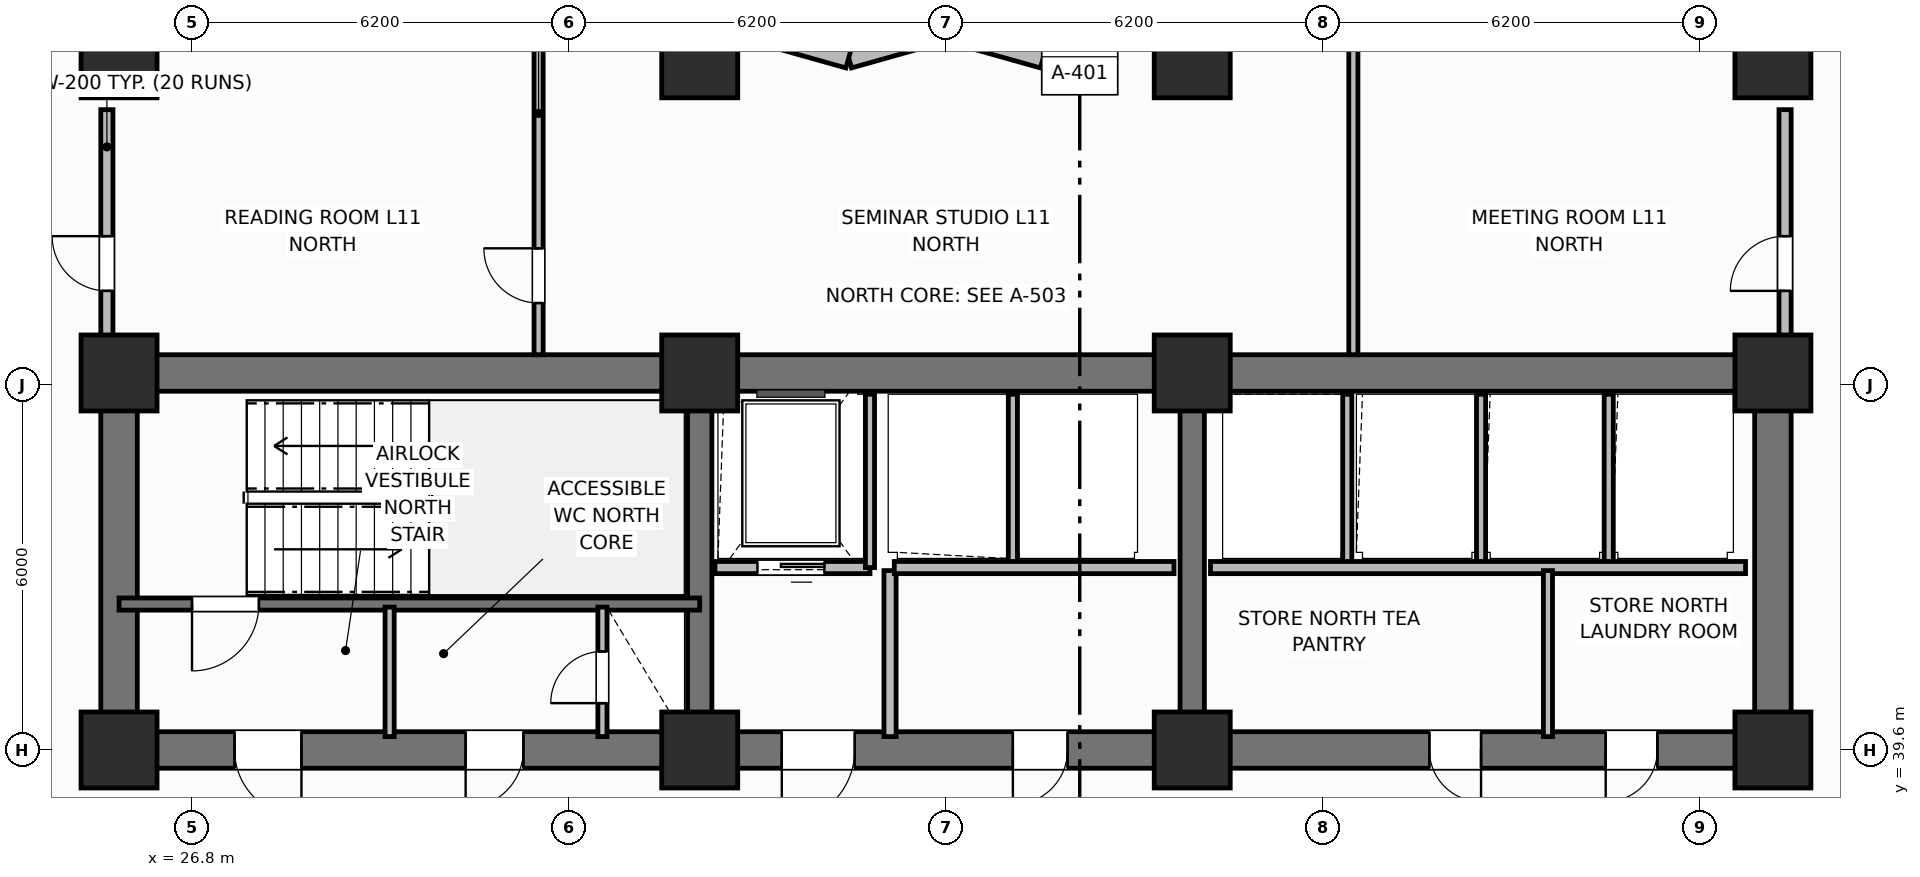
"""IFC4 building model, lengths in metres.
Left out: names, types, materials, properties, quantities, classifications, styles, units other than length and angle.
Written with IfcOpenShell. Run it as: python <this file> out.ifc"""

import sys

from ifc_helpers import new_model, si_unit, direction, frame, frame_2d, origin, origin_2d, place, context, subcontext, project, spatial, rectangle, extrude, element, fill, save


model = new_model("IFC4")
c1 = context("Model", 3, precision=1e-05, world=origin(), true_north=direction((0.0, 1.0)))
c2 = subcontext(c1, "Body", "Model", "MODEL_VIEW")
j1 = project(units=[si_unit("LENGTHUNIT", "METRE"), si_unit("PLANEANGLEUNIT", "RADIAN")], contexts=[c1])
p1 = place(None, origin())
s1 = spatial("IfcSite", under=j1, at=p1, CompositionType="ELEMENT")
p2 = place(p1, origin())
s2 = spatial("IfcBuilding", under=s1, at=p2, CompositionType="ELEMENT")
p3 = place(p2, frame((0.0, 0.0, 47.3)))
s3 = spatial("IfcBuildingStorey", under=s2, at=p3, CompositionType="ELEMENT", Elevation=47.3)
p4 = place(p3, frame((25.6, 45.8, 0.0), z_axis=(0.0, 0.0, 1.0), x_axis=(1.0, 0.0, 0.0)))
e1 = element("IfcWall", 1, at=p4, inside=s3, PredefinedType="SHEAR", context=c2, shape_type="SweptSolid", body=[
    extrude(rectangle(XDim=27.2, YDim=0.6, at=frame_2d((13.6, 0.0))), origin(), (0.0, 0.0, 1.0), 3.7),
])
for number, where, z_axis, x_axis in (
    (2, (25.6, 39.9, 0.0), (0.0, 0.0, 1.0), (0.0, 1.0, 0.0)),
    (3, (52.8, 39.9, 0.0), (0.0, 0.0, 1.0), (0.0, 1.0, 0.0)),
):
    element("IfcWall", number, at=place(p3, frame(where, z_axis=z_axis, x_axis=x_axis)), inside=s3, PredefinedType="SHEAR", context=c2, shape_type="SweptSolid", body=[
        extrude(rectangle(XDim=5.6, YDim=0.6, at=frame_2d((2.8, 0.0))), origin(), (0.0, 0.0, 1.0), 3.7),
    ])
p5 = place(p3, frame((52.8, 39.6, 0.0), z_axis=(0.0, 0.0, 1.0), x_axis=(-1.0, 0.0, 0.0)))
e4 = element("IfcWall", 4, at=p5, inside=s3, PredefinedType="SHEAR", context=c2, shape_type="SweptSolid", body=[
    extrude(rectangle(XDim=27.2, YDim=0.6, at=frame_2d((13.6, 0.0))), origin(), (0.0, 0.0, 1.0), 3.7),
])
p6 = place(p5, frame((24.2, 0.0, 0.0)))
e5 = element("IfcOpeningElement", 5, at=p6, cuts=e4, PredefinedType="OPENING", context=c2, shape_type="SweptSolid", body=[
    extrude(rectangle(XDim=1.1, YDim=2.15, at=frame_2d((0.55, 1.075))), frame((0.0, 0.31, 0.0), z_axis=(0.0, -1.0, 0.0), x_axis=(1.0, 0.0, 0.0)), (0.0, 0.0, 1.0), 0.62),
])
p7 = place(p5, frame((20.55, 0.0, 0.0)))
e6 = element("IfcOpeningElement", 6, at=p7, cuts=e4, PredefinedType="OPENING", context=c2, shape_type="SweptSolid", body=[
    extrude(rectangle(XDim=0.95, YDim=2.1, at=frame_2d((0.475, 1.05))), frame((0.0, 0.31, 0.0), z_axis=(0.0, -1.0, 0.0), x_axis=(1.0, 0.0, 0.0)), (0.0, 0.0, 1.0), 0.62),
])
p8 = place(p5, frame((15.1, 0.0, 0.0)))
e7 = element("IfcOpeningElement", 7, at=p8, cuts=e4, PredefinedType="OPENING", context=c2, shape_type="SweptSolid", body=[
    extrude(rectangle(XDim=1.2, YDim=2.15, at=frame_2d((0.6, 1.075))), frame((0.0, 0.31, 0.0), z_axis=(0.0, -1.0, 0.0), x_axis=(1.0, 0.0, 0.0)), (0.0, 0.0, 1.0), 0.62),
])
p9 = place(p5, frame((11.6, 0.0, 0.0)))
e8 = element("IfcOpeningElement", 8, at=p9, cuts=e4, PredefinedType="OPENING", context=c2, shape_type="SweptSolid", body=[
    extrude(rectangle(XDim=0.9, YDim=2.1, at=frame_2d((0.45, 1.05))), frame((0.0, 0.31, 0.0), z_axis=(0.0, -1.0, 0.0), x_axis=(1.0, 0.0, 0.0)), (0.0, 0.0, 1.0), 0.62),
])
p10 = place(p5, frame((4.8, 0.0, 0.0)))
e9 = element("IfcOpeningElement", 9, at=p10, cuts=e4, PredefinedType="OPENING", context=c2, shape_type="SweptSolid", body=[
    extrude(rectangle(XDim=0.85, YDim=2.1, at=frame_2d((0.425, 1.05))), frame((0.0, 0.31, 0.0), z_axis=(0.0, -1.0, 0.0), x_axis=(1.0, 0.0, 0.0)), (0.0, 0.0, 1.0), 0.62),
])
p11 = place(p5, frame((1.9, 0.0, 0.0)))
e10 = element("IfcOpeningElement", 10, at=p11, cuts=e4, PredefinedType="OPENING", context=c2, shape_type="SweptSolid", body=[
    extrude(rectangle(XDim=0.85, YDim=2.1, at=frame_2d((0.425, 1.05))), frame((0.0, 0.31, 0.0), z_axis=(0.0, -1.0, 0.0), x_axis=(1.0, 0.0, 0.0)), (0.0, 0.0, 1.0), 0.62),
])
for number, where, z_axis, x_axis in (
    (11, (35.15, 39.9, 0.0), (0.0, 0.0, 1.0), (0.0, 1.0, 0.0)),
    (12, (43.25, 39.9, 0.0), (0.0, 0.0, 1.0), (0.0, 1.0, 0.0)),
):
    element("IfcWall", number, at=place(p3, frame(where, z_axis=z_axis, x_axis=x_axis)), inside=s3, PredefinedType="SHEAR", context=c2, shape_type="SweptSolid", body=[
        extrude(rectangle(XDim=5.6, YDim=0.4, at=frame_2d((2.8, 0.0))), origin(), (0.0, 0.0, 1.0), 3.7),
    ])
for number, where, z_axis, x_axis in (
    (13, (25.6, 39.6, 0.0), (0.0, 0.0, 1.0), (1.0, 0.0, 0.0)),
    (14, (25.6, 45.8, 0.0), (0.0, 0.0, 1.0), (1.0, 0.0, 0.0)),
    (15, (35.15, 39.6, 0.0), (0.0, 0.0, 1.0), (1.0, 0.0, 0.0)),
    (16, (35.15, 45.8, 0.0), (0.0, 0.0, 1.0), (1.0, 0.0, 0.0)),
    (17, (43.25, 39.6, 0.0), (0.0, 0.0, 1.0), (1.0, 0.0, 0.0)),
    (18, (43.25, 45.8, 0.0), (0.0, 0.0, 1.0), (1.0, 0.0, 0.0)),
    (19, (52.8, 39.6, 0.0), (0.0, 0.0, 1.0), (1.0, 0.0, 0.0)),
    (20, (52.8, 45.8, 0.0), (0.0, 0.0, 1.0), (1.0, 0.0, 0.0)),
    (21, (25.6, 50.95, 0.0), (0.0, 0.0, 1.0), (1.0, 0.0, 0.0)),
    (22, (35.15, 50.95, 0.0), (0.0, 0.0, 1.0), (1.0, 0.0, 0.0)),
    (23, (43.25, 50.95, 0.0), (0.0, 0.0, 1.0), (1.0, 0.0, 0.0)),
    (24, (52.8, 50.95, 0.0), (0.0, 0.0, 1.0), (1.0, 0.0, 0.0)),
):
    element("IfcColumn", number, at=place(p3, frame(where, z_axis=z_axis, x_axis=x_axis)), inside=s3, PredefinedType="COLUMN", context=c2, shape_type="SweptSolid", body=[
        extrude(rectangle(XDim=1.25, YDim=1.25, at=origin_2d()), origin(), (0.0, 0.0, 1.0), 3.7),
    ])
p12 = place(p3, frame((42.4, 51.43, 0.0), z_axis=(0.0, 0.0, 1.0), x_axis=(-0.962652136636, -0.270741322725, 0.0)))
e25 = element("IfcWall", 25, at=p12, inside=s3, PredefinedType="SOLIDWALL", context=c2, shape_type="SweptSolid", body=[
    extrude(rectangle(XDim=1.662, YDim=0.34, at=frame_2d((0.831, 0.0))), origin(), (0.0, 0.0, 1.0), 2.7),
])
p13 = place(p3, frame((40.8, 50.98, 0.0), z_axis=(0.0, 0.0, 1.0), x_axis=(-0.962662902433, 0.270703040766, 0.0)))
e26 = element("IfcWall", 26, at=p13, inside=s3, PredefinedType="SOLIDWALL", context=c2, shape_type="SweptSolid", body=[
    extrude(rectangle(XDim=1.662, YDim=0.34, at=frame_2d((0.831, 0.0))), origin(), (0.0, 0.0, 1.0), 2.7),
])
p14 = place(p3, frame((39.2, 51.43, 0.0), z_axis=(0.0, 0.0, 1.0), x_axis=(-0.962652136636, -0.270741322725, 0.0)))
e27 = element("IfcWall", 27, at=p14, inside=s3, PredefinedType="SOLIDWALL", context=c2, shape_type="SweptSolid", body=[
    extrude(rectangle(XDim=1.662, YDim=0.34, at=frame_2d((0.831, 0.0))), origin(), (0.0, 0.0, 1.0), 2.7),
])
p15 = place(p3, frame((37.6, 50.98, 0.0), z_axis=(0.0, 0.0, 1.0), x_axis=(-0.962662902433, 0.270703040766, 0.0)))
e28 = element("IfcWall", 28, at=p15, inside=s3, PredefinedType="SOLIDWALL", context=c2, shape_type="SweptSolid", body=[
    extrude(rectangle(XDim=1.662, YDim=0.34, at=frame_2d((0.831, 0.0))), origin(), (0.0, 0.0, 1.0), 2.7),
])
p16 = place(p3, frame((35.15, 42.0, 0.0), z_axis=(0.0, 0.0, 1.0), x_axis=(-1.0, 0.0, 0.0)))
e29 = element("IfcWall", 29, at=p16, inside=s3, PredefinedType="SHEAR", context=c2, shape_type="SweptSolid", body=[
    extrude(rectangle(XDim=9.55, YDim=0.2, at=frame_2d((4.775, 0.0))), origin(), (0.0, 0.0, 1.0), 3.7),
])
p17 = place(p16, frame((7.25, 0.0, 0.0)))
e30 = element("IfcOpeningElement", 30, at=p17, cuts=e29, PredefinedType="OPENING", context=c2, shape_type="SweptSolid", body=[
    extrude(rectangle(XDim=1.1, YDim=2.15, at=frame_2d((0.55, 1.075))), frame((0.0, 0.11, 0.0), z_axis=(0.0, -1.0, 0.0), x_axis=(1.0, 0.0, 0.0)), (0.0, 0.0, 1.0), 0.22),
])
p18 = place(p3, frame((33.55, 39.82, 0.0), z_axis=(0.0, 0.0, 1.0), x_axis=(0.0, 1.0, 0.0)))
e31 = element("IfcWall", 31, at=p18, inside=s3, PredefinedType="PARTITIONING", context=c2, shape_type="SweptSolid", body=[
    extrude(rectangle(XDim=2.13, YDim=0.15, at=frame_2d((1.065, 0.0))), origin(), (0.0, 0.0, 1.0), 2.53),
])
p19 = place(p18, frame((0.55, 0.0, 0.0)))
e32 = element("IfcOpeningElement", 32, at=p19, cuts=e31, PredefinedType="OPENING", context=c2, shape_type="SweptSolid", body=[
    extrude(rectangle(XDim=0.85, YDim=2.05, at=frame_2d((0.425, 1.025))), frame((0.0, 0.085, 0.0), z_axis=(0.0, -1.0, 0.0), x_axis=(1.0, 0.0, 0.0)), (0.0, 0.0, 1.0), 0.17),
])
p20 = place(p3, frame((30.05, 39.82, 0.0), z_axis=(0.0, 0.0, 1.0), x_axis=(0.0, 1.0, 0.0)))
e33 = element("IfcWall", 33, at=p20, inside=s3, PredefinedType="PARTITIONING", context=c2, shape_type="SweptSolid", body=[
    extrude(rectangle(XDim=2.13, YDim=0.15, at=frame_2d((1.065, 0.0))), origin(), (0.0, 0.0, 1.0), 2.53),
])
p21 = place(p3, frame((37.95, 42.6, 0.0), z_axis=(0.0, 0.0, 1.0), x_axis=(-1.0, 0.0, 0.0)))
e34 = element("IfcWall", 34, at=p21, inside=s3, PredefinedType="PARTITIONING", context=c2, shape_type="SweptSolid", body=[
    extrude(rectangle(XDim=2.55, YDim=0.2, at=frame_2d((1.275, 0.0))), origin(), (0.0, 0.0, 1.0), 2.3),
])
p22 = place(p21, frame((0.75, 0.0, 0.0)))
e35 = element("IfcOpeningElement", 35, at=p22, cuts=e34, PredefinedType="OPENING", context=c2, shape_type="SweptSolid", body=[
    extrude(rectangle(XDim=1.1, YDim=2.15, at=frame_2d((0.55, 1.075))), frame((0.0, 0.11, 0.0), z_axis=(0.0, -1.0, 0.0), x_axis=(1.0, 0.0, 0.0)), (0.0, 0.0, 1.0), 0.22),
])
p23 = place(p3, frame((37.95, 42.6, 0.0), z_axis=(0.0, 0.0, 1.0), x_axis=(0.0, 1.0, 0.0)))
e36 = element("IfcWall", 36, at=p23, inside=s3, PredefinedType="PARTITIONING", context=c2, shape_type="SweptSolid", body=[
    extrude(rectangle(XDim=2.85, YDim=0.15, at=frame_2d((1.425, 0.0))), origin(), (0.0, 0.0, 1.0), 2.53),
])
p24 = place(p3, frame((38.28, 39.82, 0.0), z_axis=(0.0, 0.0, 1.0), x_axis=(0.0, 1.0, 0.0)))
e37 = element("IfcWall", 37, at=p24, inside=s3, PredefinedType="PARTITIONING", context=c2, shape_type="SweptSolid", body=[
    extrude(rectangle(XDim=2.73, YDim=0.2, at=frame_2d((1.365, 0.0))), origin(), (0.0, 0.0, 1.0), 2.53),
])
p25 = place(p3, frame((40.3, 42.65, 0.0), z_axis=(0.0, 0.0, 1.0), x_axis=(0.0, 1.0, 0.0)))
e38 = element("IfcWall", 38, at=p25, inside=s3, PredefinedType="PARTITIONING", context=c2, shape_type="SweptSolid", body=[
    extrude(rectangle(XDim=2.8, YDim=0.15, at=frame_2d((1.4, 0.0))), origin(), (0.0, 0.0, 1.0), 2.53),
])
p26 = place(p3, frame((42.95, 42.6, 0.0), z_axis=(0.0, 0.0, 1.0), x_axis=(-1.0, 0.0, 0.0)))
e39 = element("IfcWall", 39, at=p26, inside=s3, PredefinedType="PARTITIONING", context=c2, shape_type="SweptSolid", body=[
    extrude(rectangle(XDim=4.6, YDim=0.2, at=frame_2d((2.3, 0.0))), origin(), (0.0, 0.0, 1.0), 2.3),
])
for number, where, z_axis, x_axis in (
    (40, (45.8, 42.65, 0.0), (0.0, 0.0, 1.0), (0.0, 1.0, 0.0)),
    (41, (48.0, 42.65, 0.0), (0.0, 0.0, 1.0), (0.0, 1.0, 0.0)),
    (42, (50.1, 42.65, 0.0), (0.0, 0.0, 1.0), (0.0, 1.0, 0.0)),
):
    element("IfcWall", number, at=place(p3, frame(where, z_axis=z_axis, x_axis=x_axis)), inside=s3, PredefinedType="PARTITIONING", context=c2, shape_type="SweptSolid", body=[
        extrude(rectangle(XDim=2.8, YDim=0.15, at=frame_2d((1.4, 0.0))), origin(), (0.0, 0.0, 1.0), 2.53),
    ])
p27 = place(p3, frame((52.35, 42.6, 0.0), z_axis=(0.0, 0.0, 1.0), x_axis=(-1.0, 0.0, 0.0)))
e43 = element("IfcWall", 43, at=p27, inside=s3, PredefinedType="PARTITIONING", context=c2, shape_type="SweptSolid", body=[
    extrude(rectangle(XDim=8.8, YDim=0.2, at=frame_2d((4.4, 0.0))), origin(), (0.0, 0.0, 1.0), 2.53),
])
p28 = place(p3, frame((49.1, 39.82, 0.0), z_axis=(0.0, 0.0, 1.0), x_axis=(0.0, 1.0, 0.0)))
e44 = element("IfcWall", 44, at=p28, inside=s3, PredefinedType="PARTITIONING", context=c2, shape_type="SweptSolid", body=[
    extrude(rectangle(XDim=2.73, YDim=0.15, at=frame_2d((1.365, 0.0))), origin(), (0.0, 0.0, 1.0), 2.53),
])
p29 = place(p3, frame((32.5, 46.1, 0.0), z_axis=(0.0, 0.0, 1.0), x_axis=(0.0, 1.0, 0.0)))
e45 = element("IfcWall", 45, at=p29, inside=s3, PredefinedType="PARTITIONING", context=c2, shape_type="SweptSolid", body=[
    extrude(rectangle(XDim=5.33, YDim=0.15, at=frame_2d((2.665, 0.0))), origin(), (0.0, 0.0, 1.0), 2.53),
])
p30 = place(p29, frame((0.85, 0.0, 0.0)))
e46 = element("IfcOpeningElement", 46, at=p30, cuts=e45, PredefinedType="OPENING", context=c2, shape_type="SweptSolid", body=[
    extrude(rectangle(XDim=0.9, YDim=2.1, at=frame_2d((0.45, 1.05))), frame((0.0, 0.085, 0.0), z_axis=(0.0, -1.0, 0.0), x_axis=(1.0, 0.0, 0.0)), (0.0, 0.0, 1.0), 0.17),
])
p31 = place(p3, frame((45.9, 46.1, 0.0), z_axis=(0.0, 0.0, 1.0), x_axis=(0.0, 1.0, 0.0)))
e47 = element("IfcWall", 47, at=p31, inside=s3, PredefinedType="PARTITIONING", context=c2, shape_type="SweptSolid", body=[
    extrude(rectangle(XDim=5.33, YDim=0.15, at=frame_2d((2.665, 0.0))), origin(), (0.0, 0.0, 1.0), 2.53),
])
p32 = place(p3, frame((25.4, 46.1, 0.0), z_axis=(0.0, 0.0, 1.0), x_axis=(0.0, 1.0, 0.0)))
e48 = element("IfcWall", 48, at=p32, inside=s3, PredefinedType="PARTITIONING", context=c2, shape_type="SweptSolid", body=[
    extrude(rectangle(XDim=4.03, YDim=0.2, at=frame_2d((2.015, 0.0))), origin(), (0.0, 0.0, 1.0), 2.53),
])
p33 = place(p32, frame((1.05, 0.0, 0.0)))
e49 = element("IfcOpeningElement", 49, at=p33, cuts=e48, PredefinedType="OPENING", context=c2, shape_type="SweptSolid", body=[
    extrude(rectangle(XDim=0.9, YDim=2.1, at=frame_2d((0.45, 1.05))), frame((0.0, 0.11, 0.0), z_axis=(0.0, -1.0, 0.0), x_axis=(1.0, 0.0, 0.0)), (0.0, 0.0, 1.0), 0.22),
])
p34 = place(p3, frame((53.0, 46.1, 0.0), z_axis=(0.0, 0.0, 1.0), x_axis=(0.0, 1.0, 0.0)))
e50 = element("IfcWall", 50, at=p34, inside=s3, PredefinedType="PARTITIONING", context=c2, shape_type="SweptSolid", body=[
    extrude(rectangle(XDim=4.03, YDim=0.2, at=frame_2d((2.015, 0.0))), origin(), (0.0, 0.0, 1.0), 2.53),
])
p35 = place(p34, frame((1.05, 0.0, 0.0)))
e51 = element("IfcOpeningElement", 51, at=p35, cuts=e50, PredefinedType="OPENING", context=c2, shape_type="SweptSolid", body=[
    extrude(rectangle(XDim=0.9, YDim=2.1, at=frame_2d((0.45, 1.05))), frame((0.0, 0.11, 0.0), z_axis=(0.0, -1.0, 0.0), x_axis=(1.0, 0.0, 0.0)), (0.0, 0.0, 1.0), 0.22),
])
p36 = place(p17, origin())
e52 = element("IfcDoor", 52, at=p36, inside=s3, OperationType="SINGLE_SWING_RIGHT", PredefinedType="DOOR", context=c2, shape_type="SweptSolid", body=[
    extrude(rectangle(XDim=1.1, YDim=2.15, at=frame_2d((0.55, 1.075))), frame((0.0, 0.025, 0.0), z_axis=(0.0, -1.0, 0.0), x_axis=(1.0, 0.0, 0.0)), (0.0, 0.0, 1.0), 0.05),
])
fill(e30, e52)
p37 = place(p19, origin())
e53 = element("IfcDoor", 53, at=p37, inside=s3, OperationType="SINGLE_SWING_LEFT", PredefinedType="TRAPDOOR", context=c2, shape_type="SweptSolid", body=[
    extrude(rectangle(XDim=0.85, YDim=2.05, at=frame_2d((0.425, 1.025))), frame((0.0, 0.025, 0.0), z_axis=(0.0, -1.0, 0.0), x_axis=(1.0, 0.0, 0.0)), (0.0, 0.0, 1.0), 0.05),
])
fill(e32, e53)
p38 = place(p22, origin())
e54 = element("IfcDoor", 54, at=p38, inside=s3, OperationType="SLIDING_TO_LEFT", PredefinedType="DOOR", context=c2, shape_type="SweptSolid", body=[
    extrude(rectangle(XDim=1.1, YDim=2.15, at=frame_2d((0.55, 1.075))), frame((0.0, 0.025, 0.0), z_axis=(0.0, -1.0, 0.0), x_axis=(1.0, 0.0, 0.0)), (0.0, 0.0, 1.0), 0.05),
])
fill(e35, e54)
p39 = place(p30, origin())
e55 = element("IfcDoor", 55, at=p39, inside=s3, OperationType="SINGLE_SWING_RIGHT", PredefinedType="DOOR", context=c2, shape_type="SweptSolid", body=[
    extrude(rectangle(XDim=0.9, YDim=2.1, at=frame_2d((0.45, 1.05))), frame((0.0, 0.025, 0.0), z_axis=(0.0, -1.0, 0.0), x_axis=(1.0, 0.0, 0.0)), (0.0, 0.0, 1.0), 0.05),
])
fill(e46, e55)
p40 = place(p33, origin())
e56 = element("IfcDoor", 56, at=p40, inside=s3, OperationType="SINGLE_SWING_RIGHT", PredefinedType="DOOR", context=c2, shape_type="SweptSolid", body=[
    extrude(rectangle(XDim=0.9, YDim=2.1, at=frame_2d((0.45, 1.05))), frame((0.0, 0.025, 0.0), z_axis=(0.0, -1.0, 0.0), x_axis=(1.0, 0.0, 0.0)), (0.0, 0.0, 1.0), 0.05),
])
fill(e49, e56)
p41 = place(p35, origin())
e57 = element("IfcDoor", 57, at=p41, inside=s3, OperationType="SINGLE_SWING_LEFT", PredefinedType="DOOR", context=c2, shape_type="SweptSolid", body=[
    extrude(rectangle(XDim=0.9, YDim=2.1, at=frame_2d((0.45, 1.05))), frame((0.0, 0.025, 0.0), z_axis=(0.0, -1.0, 0.0), x_axis=(1.0, 0.0, 0.0)), (0.0, 0.0, 1.0), 0.05),
])
fill(e51, e57)
p42 = place(p6, origin())
e58 = element("IfcDoor", 58, at=p42, inside=s3, OperationType="SINGLE_SWING_LEFT", PredefinedType="DOOR", context=c2, shape_type="SweptSolid", body=[
    extrude(rectangle(XDim=1.1, YDim=2.15, at=frame_2d((0.55, 1.075))), frame((0.0, 0.025, 0.0), z_axis=(0.0, -1.0, 0.0), x_axis=(1.0, 0.0, 0.0)), (0.0, 0.0, 1.0), 0.05),
])
fill(e5, e58)
p43 = place(p7, origin())
e59 = element("IfcDoor", 59, at=p43, inside=s3, OperationType="SINGLE_SWING_RIGHT", PredefinedType="DOOR", context=c2, shape_type="SweptSolid", body=[
    extrude(rectangle(XDim=0.95, YDim=2.1, at=frame_2d((0.475, 1.05))), frame((0.0, 0.025, 0.0), z_axis=(0.0, -1.0, 0.0), x_axis=(1.0, 0.0, 0.0)), (0.0, 0.0, 1.0), 0.05),
])
fill(e6, e59)
p44 = place(p8, origin())
e60 = element("IfcDoor", 60, at=p44, inside=s3, OperationType="SINGLE_SWING_RIGHT", PredefinedType="DOOR", context=c2, shape_type="SweptSolid", body=[
    extrude(rectangle(XDim=1.2, YDim=2.15, at=frame_2d((0.6, 1.075))), frame((0.0, 0.025, 0.0), z_axis=(0.0, -1.0, 0.0), x_axis=(1.0, 0.0, 0.0)), (0.0, 0.0, 1.0), 0.05),
])
fill(e7, e60)
p45 = place(p9, origin())
e61 = element("IfcDoor", 61, at=p45, inside=s3, OperationType="SINGLE_SWING_RIGHT", PredefinedType="DOOR", context=c2, shape_type="SweptSolid", body=[
    extrude(rectangle(XDim=0.9, YDim=2.1, at=frame_2d((0.45, 1.05))), frame((0.0, 0.025, 0.0), z_axis=(0.0, -1.0, 0.0), x_axis=(1.0, 0.0, 0.0)), (0.0, 0.0, 1.0), 0.05),
])
fill(e8, e61)
p46 = place(p10, origin())
e62 = element("IfcDoor", 62, at=p46, inside=s3, OperationType="SINGLE_SWING_LEFT", PredefinedType="DOOR", context=c2, shape_type="SweptSolid", body=[
    extrude(rectangle(XDim=0.85, YDim=2.1, at=frame_2d((0.425, 1.05))), frame((0.0, 0.025, 0.0), z_axis=(0.0, -1.0, 0.0), x_axis=(1.0, 0.0, 0.0)), (0.0, 0.0, 1.0), 0.05),
])
fill(e9, e62)
p47 = place(p11, origin())
e63 = element("IfcDoor", 63, at=p47, inside=s3, OperationType="SINGLE_SWING_RIGHT", PredefinedType="DOOR", context=c2, shape_type="SweptSolid", body=[
    extrude(rectangle(XDim=0.85, YDim=2.1, at=frame_2d((0.425, 1.05))), frame((0.0, 0.025, 0.0), z_axis=(0.0, -1.0, 0.0), x_axis=(1.0, 0.0, 0.0)), (0.0, 0.0, 1.0), 0.05),
])
fill(e10, e63)
save(model, sys.argv[1])
